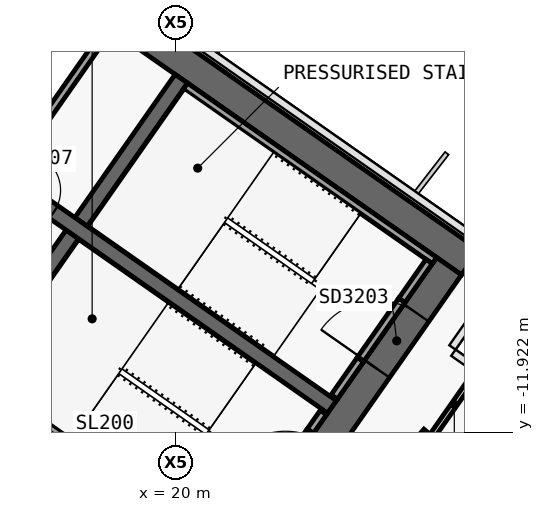
"""IFC4 building model, lengths in metres.
Left out: names, types, materials, properties, quantities, classifications, styles, units other than length and angle.
Written with IfcOpenShell. Run it as: python <this file> out.ifc"""

import sys

from ifc_helpers import new_model, si_unit, direction, frame, frame_2d, origin, place, context, subcontext, project, spatial, polyline, rectangle, outline, extrude, element, fill, save


model = new_model("IFC4")
c1 = context("Model", 3, precision=1e-05, world=origin(), true_north=direction((0.0, 1.0)))
c2 = subcontext(c1, "Body", "Model", "MODEL_VIEW")
j1 = project(units=[si_unit("LENGTHUNIT", "METRE"), si_unit("PLANEANGLEUNIT", "RADIAN")], contexts=[c1])
p1 = place(None, origin())
s1 = spatial("IfcSite", under=j1, at=p1, CompositionType="ELEMENT")
p2 = place(p1, origin())
s2 = spatial("IfcBuilding", under=s1, at=p2, CompositionType="ELEMENT")
p3 = place(p2, frame((0.0, 0.0, 182.7)))
s3 = spatial("IfcBuildingStorey", under=s2, at=p3, CompositionType="ELEMENT", Elevation=182.7)
p4 = place(p3, frame((-0.029, 11.984, 0.0), z_axis=(0.0, 0.0, 1.0), x_axis=(0.819151382952, -0.573577380837, 0.0)))
e1 = element("IfcWall", 1, at=p4, inside=s3, PredefinedType="SHEAR", context=c2, shape_type="SweptSolid", body=[
    extrude(outline(polyline([(33.898, 0.4), (-0.0, 0.4), (0.56, -0.4), (33.898, -0.4), (33.898, 0.4)])), origin(), (0.0, 0.0, 1.0), 3.9),
])
p5 = place(p3, frame((-0.029, -0.712, 0.0), z_axis=(0.0, 0.0, 1.0), x_axis=(0.819151758019, -0.573576845187, 0.0)))
e2 = element("IfcWall", 2, at=p5, inside=s3, PredefinedType="SHEAR", context=c2, shape_type="SweptSolid", body=[
    extrude(outline(polyline([(26.616, 0.4), (-0.0, 0.4), (0.56, -0.4), (26.616, -0.4), (26.616, 0.4)])), origin(), (0.0, 0.0, 1.0), 3.9),
])
p6 = place(p5, frame((6.666, 0.0, 0.0)))
e3 = element("IfcOpeningElement", 3, at=p6, cuts=e2, PredefinedType="OPENING", context=c2, shape_type="SweptSolid", body=[
    extrude(rectangle(XDim=1.5, YDim=2.1, at=frame_2d((0.75, 1.05))), frame((0.0, 0.41, 0.0), z_axis=(0.0, -1.0, 0.0), x_axis=(1.0, 0.0, 0.0)), (0.0, 0.0, 1.0), 0.82),
])
p7 = place(p5, frame((12.366, 0.0, 0.0)))
e4 = element("IfcOpeningElement", 4, at=p7, cuts=e2, PredefinedType="OPENING", context=c2, shape_type="SweptSolid", body=[
    extrude(rectangle(XDim=1.5, YDim=2.1, at=frame_2d((0.75, 1.05))), frame((0.0, 0.41, 0.0), z_axis=(0.0, -1.0, 0.0), x_axis=(1.0, 0.0, 0.0)), (0.0, 0.0, 1.0), 0.82),
])
p8 = place(p3, frame((21.675, -15.421, 0.0), z_axis=(0.0, 0.0, 1.0), x_axis=(0.573581815061, 0.819148278049, 0.0)))
e5 = element("IfcWall", 5, at=p8, inside=s3, PredefinedType="SHEAR", context=c2, shape_type="SweptSolid", body=[
    extrude(outline(polyline([(9.6, 0.4), (0.0, 0.4), (0.0, -0.4), (9.6, -0.4), (9.6, 0.4)])), origin(), (0.0, 0.0, 1.0), 3.9),
])
p9 = place(p8, frame((6.3, 0.0, 0.0)))
e6 = element("IfcOpeningElement", 6, at=p9, cuts=e5, PredefinedType="OPENING", context=c2, shape_type="SweptSolid", body=[
    extrude(rectangle(XDim=1.8, YDim=2.1, at=frame_2d((0.9, 1.05))), frame((0.0, 0.41, 0.0), z_axis=(0.0, -1.0, 0.0), x_axis=(1.0, 0.0, 0.0)), (0.0, 0.0, 1.0), 0.82),
])
p10 = place(p8, frame((2.1, 0.0, 0.0)))
e7 = element("IfcOpeningElement", 7, at=p10, cuts=e5, PredefinedType="OPENING", context=c2, shape_type="SweptSolid", body=[
    extrude(rectangle(XDim=1.8, YDim=2.1, at=frame_2d((0.9, 1.05))), frame((0.0, 0.41, 0.0), z_axis=(0.0, -1.0, 0.0), x_axis=(1.0, 0.0, 0.0)), (0.0, 0.0, 1.0), 0.82),
])
p11 = place(p3, frame((14.63, -10.488, 0.0), z_axis=(0.0, 0.0, 1.0), x_axis=(0.573611936273, 0.819127185829, 0.0)))
e8 = element("IfcWall", 8, at=p11, inside=s3, PredefinedType="SHEAR", context=c2, shape_type="SweptSolid", body=[
    extrude(outline(polyline([(0.0, 0.2), (0.0, -0.2), (4.6, -0.2), (4.6, 0.2), (0.0, 0.2)])), origin(), (0.0, 0.0, 1.0), 3.9),
])
p12 = place(p3, frame((17.498, -6.392, 0.0), z_axis=(0.0, 0.0, 1.0), x_axis=(0.573611936273, 0.819127185829, 0.0)))
e9 = element("IfcWall", 9, at=p12, inside=s3, PredefinedType="SHEAR", context=c2, shape_type="SweptSolid", body=[
    extrude(outline(polyline([(4.6, -0.2), (4.6, 0.2), (0.0, 0.2), (0.0, -0.2), (4.6, -0.2)])), origin(), (0.0, 0.0, 1.0), 3.9),
])
p13 = place(p3, frame((2.638, 3.768, 0.0), z_axis=(0.0, 0.0, 1.0), x_axis=(0.81915267502, -0.573575535572, 0.0)))
e10 = element("IfcWall", 10, at=p13, inside=s3, PredefinedType="SHEAR", context=c2, shape_type="SweptSolid", body=[
    extrude(outline(polyline([(0.0, 0.2), (0.0, -0.2), (26.2, -0.2), (26.2, 0.2), (0.0, 0.2)])), origin(), (0.0, 0.0, 1.0), 3.9),
])
p14 = place(p13, frame((9.637, 0.0, 0.0)))
e11 = element("IfcOpeningElement", 11, at=p14, cuts=e10, PredefinedType="OPENING", context=c2, shape_type="SweptSolid", body=[
    extrude(rectangle(XDim=1.2, YDim=2.1, at=frame_2d((0.6, 1.05))), frame((0.0, 0.21, 0.0), z_axis=(0.0, -1.0, 0.0), x_axis=(1.0, 0.0, 0.0)), (0.0, 0.0, 1.0), 0.42),
])
p15 = place(p13, frame((11.812, 0.0, 0.0)))
e12 = element("IfcOpeningElement", 12, at=p15, cuts=e10, PredefinedType="OPENING", context=c2, shape_type="SweptSolid", body=[
    extrude(rectangle(XDim=1.2, YDim=2.1, at=frame_2d((0.6, 1.05))), frame((0.0, 0.21, 0.0), z_axis=(0.0, -1.0, 0.0), x_axis=(1.0, 0.0, 0.0)), (0.0, 0.0, 1.0), 0.42),
])
p16 = place(p13, frame((13.988, 0.0, 0.0)))
e13 = element("IfcOpeningElement", 13, at=p16, cuts=e10, PredefinedType="OPENING", context=c2, shape_type="SweptSolid", body=[
    extrude(rectangle(XDim=1.2, YDim=2.1, at=frame_2d((0.6, 1.05))), frame((0.0, 0.21, 0.0), z_axis=(0.0, -1.0, 0.0), x_axis=(1.0, 0.0, 0.0)), (0.0, 0.0, 1.0), 0.42),
])
p17 = place(p13, frame((16.262, 0.0, 0.0)))
e14 = element("IfcOpeningElement", 14, at=p17, cuts=e10, PredefinedType="OPENING", context=c2, shape_type="SweptSolid", body=[
    extrude(rectangle(XDim=1.0, YDim=2.1, at=frame_2d((0.5, 1.05))), frame((0.0, 0.21, 0.0), z_axis=(0.0, -1.0, 0.0), x_axis=(1.0, 0.0, 0.0)), (0.0, 0.0, 1.0), 0.42),
])
p18 = place(p3, frame((15.594, -5.059, 0.0), z_axis=(0.0, 0.0, 1.0), x_axis=(0.573540709186, 0.819177059558, 0.0)))
e15 = element("IfcWall", 15, at=p18, inside=s3, PredefinedType="SOLIDWALL", context=c2, shape_type="SweptSolid", body=[
    extrude(rectangle(XDim=4.6, YDim=0.2, at=frame_2d((2.3, 0.0))), origin(), (0.0, 0.0, 1.0), 3.9),
])
p19 = place(p3, frame((20.243, -2.821, 0.0), z_axis=(0.0, 0.0, 1.0), x_axis=(0.819141584393, -0.57359137434, 0.0)))
e16 = element("IfcWall", 16, at=p19, inside=s3, PredefinedType="SOLIDWALL", context=c2, shape_type="SweptSolid", body=[
    extrude(rectangle(XDim=8.0, YDim=0.2, at=frame_2d((4.0, 0.0))), origin(), (0.0, 0.0, 1.0), 3.62),
])
p20 = place(p3, frame((24.162, -10.998, 0.0), z_axis=(0.0, 0.0, 1.0), x_axis=(0.573612502218, 0.819126789514, 0.0)))
e17 = element("IfcWall", 17, at=p20, inside=s3, PredefinedType="SOLIDWALL", context=c2, shape_type="SweptSolid", body=[
    extrude(rectangle(XDim=1.2, YDim=0.2, at=frame_2d((0.6, 0.0))), origin(), (0.0, 0.0, 1.0), 3.62),
])
p21 = place(p3, frame((25.94, -8.458, 0.0), z_axis=(0.0, 0.0, 1.0), x_axis=(0.573619628835, 0.819121798889, 0.0)))
e18 = element("IfcWall", 18, at=p21, inside=s3, PredefinedType="SOLIDWALL", context=c2, shape_type="SweptSolid", body=[
    extrude(rectangle(XDim=1.25, YDim=0.2, at=frame_2d((0.625, 0.0))), origin(), (0.0, 0.0, 1.0), 3.62),
])
p22 = place(p3, frame((24.85, -10.014, 2.15), z_axis=(0.0, 0.0, 1.0), x_axis=(0.573505465124, 0.819201734296, 0.0)))
e19 = element("IfcWall", 19, at=p22, inside=s3, PredefinedType="SOLIDWALL", context=c2, shape_type="SweptSolid", body=[
    extrude(rectangle(XDim=1.9, YDim=0.2, at=frame_2d((0.95, 0.0))), origin(), (0.0, 0.0, 1.0), 1.47),
])
p23 = place(p3, frame((14.851, -10.521, 0.0), z_axis=(0.0, 0.0, 1.0), x_axis=(0.819141584393, -0.57359137434, 0.0)))
e20 = element("IfcWall", 20, at=p23, inside=s3, PredefinedType="SOLIDWALL", context=c2, shape_type="SweptSolid", body=[
    extrude(rectangle(XDim=8.0, YDim=0.2, at=frame_2d((4.0, 0.0))), origin(), (0.0, 0.0, 1.0), 3.62),
])
p24 = place(p3, frame((23.531, -11.898, 0.0), z_axis=(0.0, 0.0, 1.0), x_axis=(0.573708088123, 0.819059844958, 0.0)))
e21 = element("IfcWall", 21, at=p24, inside=s3, PredefinedType="SOLIDWALL", context=c2, shape_type="SweptSolid", body=[
    extrude(rectangle(XDim=0.6, YDim=0.2, at=frame_2d((0.3, 0.0))), origin(), (0.0, 0.0, 1.0), 3.62),
])
p25 = place(p3, frame((22.441, -13.455, 2.15), z_axis=(0.0, 0.0, 1.0), x_axis=(0.573591692345, 0.819141361715, 0.0)))
e22 = element("IfcWall", 22, at=p25, inside=s3, PredefinedType="SOLIDWALL", context=c2, shape_type="SweptSolid", body=[
    extrude(rectangle(XDim=1.9, YDim=0.2, at=frame_2d((0.95, 0.0))), origin(), (0.0, 0.0, 1.0), 1.47),
])
p26 = place(p3, frame((20.513, -17.781, 0.0), z_axis=(0.0, 0.0, 1.0), x_axis=(-0.819147172988, 0.573583393228, 0.0)))
e23 = element("IfcWall", 23, at=p26, inside=s3, PredefinedType="PARTITIONING", context=c2, shape_type="SweptSolid", body=[
    extrude(rectangle(XDim=18.002, YDim=0.15, at=frame_2d((9.001, 0.0))), origin(), (0.0, 0.0, 1.0), 3.0),
])
p27 = place(p26, frame((8.201, 0.0, 0.0)))
e24 = element("IfcOpeningElement", 24, at=p27, cuts=e23, PredefinedType="OPENING", context=c2, shape_type="SweptSolid", body=[
    extrude(rectangle(XDim=1.6, YDim=2.1, at=frame_2d((0.8, 1.05))), frame((0.0, 0.085, 0.0), z_axis=(0.0, -1.0, 0.0), x_axis=(1.0, 0.0, 0.0)), (0.0, 0.0, 1.0), 0.17),
])
p28 = place(p3, frame((25.258, -13.412, 0.0), z_axis=(0.0, 0.0, 1.0), x_axis=(0.656791883473, 0.75407189432, 0.0)))
e25 = element("IfcWall", 25, at=p28, inside=s3, PredefinedType="PARTITIONING", context=c2, shape_type="SweptSolid", body=[
    extrude(rectangle(XDim=2.01, YDim=0.15, at=frame_2d((1.005, 0.0))), origin(), (0.0, 0.0, 1.0), 3.62),
])
p29 = place(p3, frame((26.746, -12.014, 0.0), z_axis=(0.0, 0.0, 1.0), x_axis=(0.573568836472, 0.819157365729, 0.0)))
e26 = element("IfcWall", 26, at=p29, inside=s3, PredefinedType="PARTITIONING", context=c2, shape_type="SweptSolid", body=[
    extrude(rectangle(XDim=2.0, YDim=0.15, at=frame_2d((1.0, 0.0))), origin(), (0.0, 0.0, 1.0), 3.0),
])
p30 = place(p3, frame((17.643, -21.877, 0.0), z_axis=(0.0, 0.0, 1.0), x_axis=(-0.819154173185, 0.573573395961, 0.0)))
e27 = element("IfcWall", 27, at=p30, inside=s3, PredefinedType="PARTITIONING", context=c2, shape_type="SweptSolid", body=[
    extrude(rectangle(XDim=18.0, YDim=0.1, at=frame_2d((9.0, 0.0))), origin(), (0.0, 0.0, 1.0), 3.0),
])
p31 = place(p30, frame((8.55, 0.0, 0.0)))
e28 = element("IfcOpeningElement", 28, at=p31, cuts=e27, PredefinedType="OPENING", context=c2, shape_type="SweptSolid", body=[
    extrude(rectangle(XDim=0.9, YDim=2.1, at=frame_2d((0.45, 1.05))), frame((0.0, 0.06, 0.0), z_axis=(0.0, -1.0, 0.0), x_axis=(1.0, 0.0, 0.0)), (0.0, 0.0, 1.0), 0.12),
])
p32 = place(p17, origin())
e29 = element("IfcDoor", 29, at=p32, inside=s3, OperationType="SINGLE_SWING_RIGHT", PredefinedType="DOOR", context=c2, shape_type="SweptSolid", body=[
    extrude(rectangle(XDim=1.0, YDim=2.1, at=frame_2d((0.5, 1.05))), frame((0.0, 0.025, 0.0), z_axis=(0.0, -1.0, 0.0), x_axis=(1.0, 0.0, 0.0)), (0.0, 0.0, 1.0), 0.05),
])
fill(e14, e29)
p33 = place(p9, origin())
e30 = element("IfcDoor", 30, at=p33, inside=s3, OperationType="DOUBLE_DOOR_SINGLE_SWING", PredefinedType="DOOR", context=c2, shape_type="SweptSolid", body=[
    extrude(rectangle(XDim=1.8, YDim=2.1, at=frame_2d((0.9, 1.05))), frame((0.0, 0.025, 0.0), z_axis=(0.0, -1.0, 0.0), x_axis=(1.0, 0.0, 0.0)), (0.0, 0.0, 1.0), 0.05),
])
fill(e6, e30)
save(model, sys.argv[1])
